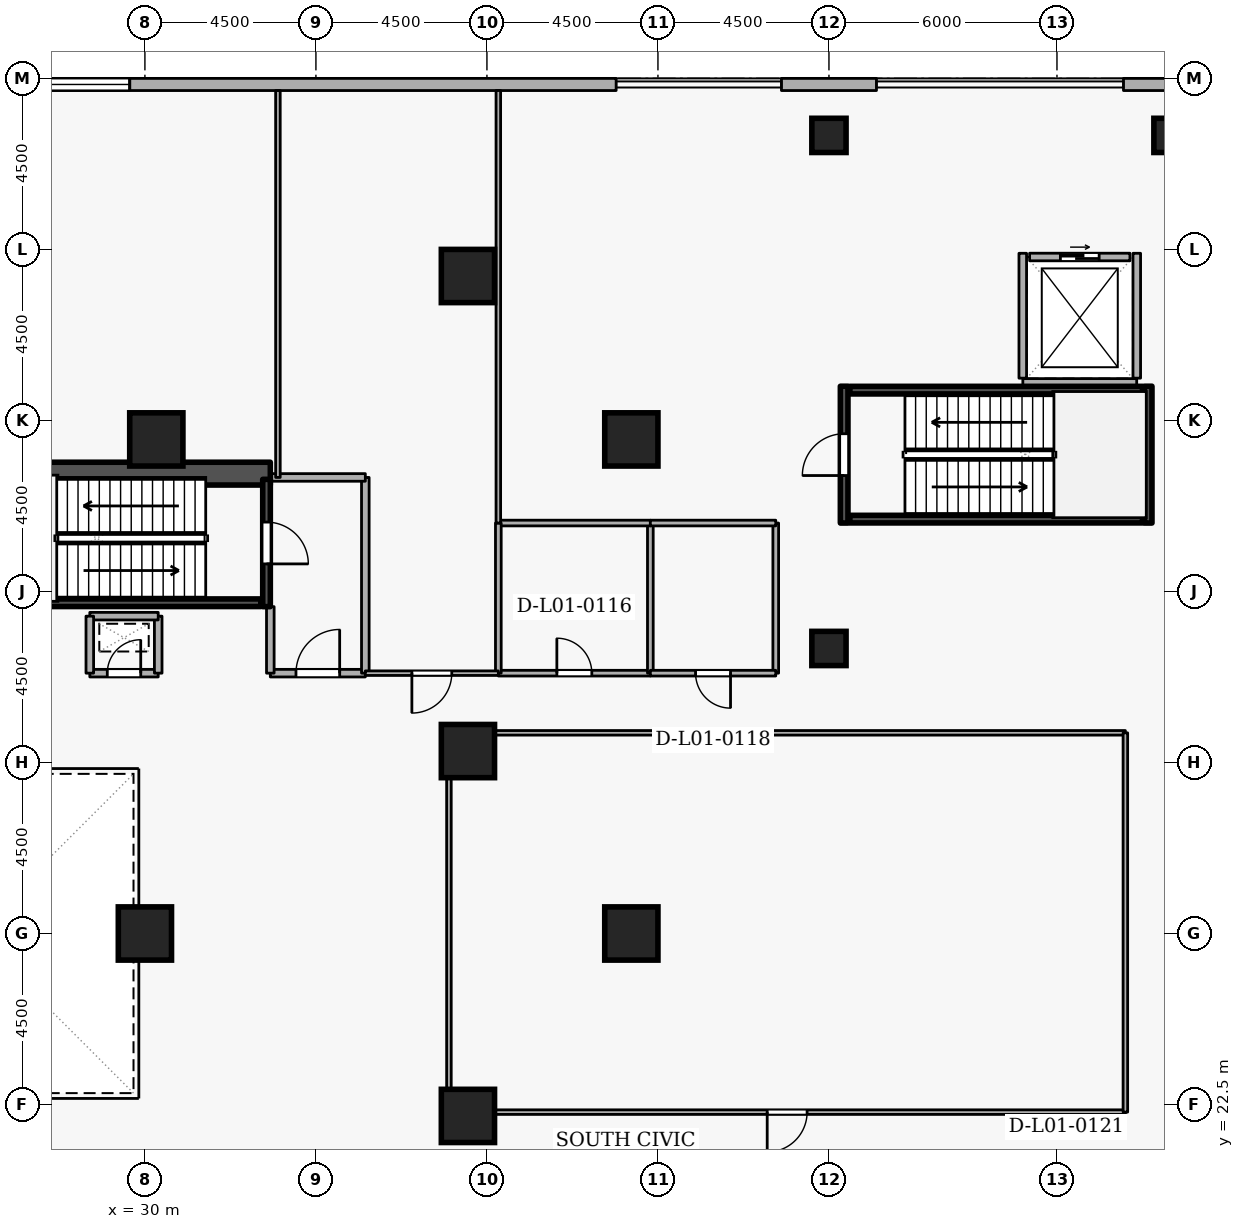
"""IFC4 building model, lengths in metres.
Left out: names, types, materials, properties, quantities, classifications, styles, units other than length and angle.
Written with IfcOpenShell. Run it as: python <this file> out.ifc"""

import sys

from ifc_helpers import new_model, si_unit, direction, frame, frame_2d, origin, origin_2d, place, context, subcontext, project, spatial, rectangle, extrude, element, fill, save


model = new_model("IFC4")
c1 = context("Model", 3, precision=1e-05, world=origin(), true_north=direction((0.0, 1.0)))
c2 = subcontext(c1, "Body", "Model", "MODEL_VIEW")
j1 = project(units=[si_unit("LENGTHUNIT", "METRE"), si_unit("PLANEANGLEUNIT", "RADIAN")], contexts=[c1])
p1 = place(None, origin())
s1 = spatial("IfcSite", under=j1, at=p1, CompositionType="ELEMENT")
p2 = place(p1, origin())
s2 = spatial("IfcBuilding", under=s1, at=p2, CompositionType="ELEMENT")
p3 = place(p2, frame((0.0, 0.0, 4.8)))
s3 = spatial("IfcBuildingStorey", under=s2, at=p3, CompositionType="ELEMENT", Elevation=4.8)
p4 = place(p3, frame((17.7, 39.1, 0.0), z_axis=(0.0, 0.0, 1.0), x_axis=(1.0, 0.0, 0.0)))
e1 = element("IfcWall", 1, at=p4, inside=s3, PredefinedType="SHEAR", context=c2, shape_type="SweptSolid", body=[
    extrude(rectangle(XDim=15.6, YDim=0.6, at=frame_2d((7.8, 0.0))), origin(), (0.0, 0.0, 1.0), 4.8),
])
for number, where, z_axis, x_axis in (
    (2, (42.8, 27.0, 0.0), (0.0, 0.0, 1.0), (1.0, 0.0, 0.0)),
    (3, (42.8, 40.0, 0.0), (0.0, 0.0, 1.0), (1.0, 0.0, 0.0)),
    (4, (38.5, 44.3, 0.0), (0.0, 0.0, 1.0), (1.0, 0.0, 0.0)),
    (5, (38.5, 22.2, 0.0), (0.0, 0.0, 1.0), (1.0, 0.0, 0.0)),
    (6, (38.5, 31.8, 0.0), (0.0, 0.0, 1.0), (1.0, 0.0, 0.0)),
    (7, (30.3, 40.0, 0.0), (0.0, 0.0, 1.0), (1.0, 0.0, 0.0)),
    (8, (30.0, 27.0, 0.0), (0.0, 0.0, 1.0), (1.0, 0.0, 0.0)),
):
    element("IfcColumn", number, at=place(p3, frame(where, z_axis=z_axis, x_axis=x_axis)), inside=s3, PredefinedType="COLUMN", context=c2, shape_type="SweptSolid", body=[
        extrude(rectangle(XDim=1.4, YDim=1.4, at=origin_2d()), origin(), (0.0, 0.0, 1.0), 4.8),
    ])
for number, where, z_axis, x_axis in (
    (9, (48.0, 34.5, 0.0), (0.0, 0.0, 1.0), (1.0, 0.0, 0.0)),
    (10, (48.0, 48.0, 0.0), (0.0, 0.0, 1.0), (1.0, 0.0, 0.0)),
    (11, (57.0, 48.0, 0.0), (0.0, 0.0, 1.0), (1.0, 0.0, 0.0)),
):
    element("IfcColumn", number, at=place(p3, frame(where, z_axis=z_axis, x_axis=x_axis)), inside=s3, PredefinedType="COLUMN", context=c2, shape_type="SweptSolid", body=[
        extrude(rectangle(XDim=0.9, YDim=0.9, at=origin_2d()), origin(), (0.0, 0.0, 1.0), 4.8),
    ])
for number, where, z_axis, x_axis in (
    (12, (58.25, 49.34, 0.0), (0.0, 0.0, 1.0), (-1.0, 0.0, 0.0)),
    (13, (49.25, 49.34, 0.0), (0.0, 0.0, 1.0), (-1.0, 0.0, 0.0)),
):
    element("IfcWall", number, at=place(p3, frame(where, z_axis=z_axis, x_axis=x_axis)), inside=s3, PredefinedType="STANDARD", context=c2, shape_type="SweptSolid", body=[
        extrude(rectangle(XDim=2.5, YDim=0.32, at=frame_2d((1.25, 0.0))), origin(), (0.0, 0.0, 1.0), 3.86),
    ])
p5 = place(p3, frame((42.4, 49.34, 0.0), z_axis=(0.0, 0.0, 1.0), x_axis=(-1.0, 0.0, 0.0)))
e14 = element("IfcWall", 14, at=p5, inside=s3, PredefinedType="STANDARD", context=c2, shape_type="SweptSolid", body=[
    extrude(rectangle(XDim=39.4, YDim=0.32, at=frame_2d((19.7, 0.0))), origin(), (0.0, 0.0, 1.0), 3.86),
])
p6 = place(p5, frame((12.8, 0.0, 0.78)))
e15 = element("IfcOpeningElement", 15, at=p6, cuts=e14, PredefinedType="OPENING", context=c2, shape_type="SweptSolid", body=[
    extrude(rectangle(XDim=2.1, YDim=2.4, at=frame_2d((1.05, 1.2))), frame((0.0, 0.17, 0.0), z_axis=(0.0, -1.0, 0.0), x_axis=(1.0, 0.0, 0.0)), (0.0, 0.0, 1.0), 0.34),
])
p7 = place(p5, frame((22.8, 0.0, 0.78)))
e16 = element("IfcOpeningElement", 16, at=p7, cuts=e14, PredefinedType="OPENING", context=c2, shape_type="SweptSolid", body=[
    extrude(rectangle(XDim=2.1, YDim=2.4, at=frame_2d((1.05, 1.2))), frame((0.0, 0.17, 0.0), z_axis=(0.0, -1.0, 0.0), x_axis=(1.0, 0.0, 0.0)), (0.0, 0.0, 1.0), 0.34),
])
p8 = place(p3, frame((53.28, 44.8, 0.0), z_axis=(0.0, 0.0, 1.0), x_axis=(1.0, 0.0, 0.0)))
e17 = element("IfcWall", 17, at=p8, inside=s3, PredefinedType="STANDARD", context=c2, shape_type="SweptSolid", body=[
    extrude(rectangle(XDim=2.64, YDim=0.2, at=frame_2d((1.32, 0.0))), origin(), (0.0, 0.0, 1.0), 4.46),
])
p9 = place(p8, frame((0.81, 0.0, 0.0)))
e18 = element("IfcOpeningElement", 18, at=p9, cuts=e17, PredefinedType="OPENING", context=c2, shape_type="SweptSolid", body=[
    extrude(rectangle(XDim=1.02, YDim=2.06, at=frame_2d((0.51, 1.03))), frame((0.0, 0.11, 0.0), z_axis=(0.0, -1.0, 0.0), x_axis=(1.0, 0.0, 0.0)), (0.0, 0.0, 1.0), 0.22),
])
p10 = place(p3, frame((53.102, 41.5, 0.0), z_axis=(0.0, 0.0, 1.0), x_axis=(1.0, 0.0, 0.0)))
e19 = element("IfcWall", 19, at=p10, inside=s3, PredefinedType="STANDARD", context=c2, shape_type="SweptSolid", body=[
    extrude(rectangle(XDim=2.996, YDim=0.2, at=frame_2d((1.498, 0.0))), origin(), (0.0, 0.0, 1.0), 4.46),
])
for number, where, z_axis, x_axis in (
    (20, (56.1, 41.612, 0.0), (0.0, 0.0, 1.0), (0.0, 1.0, 0.0)),
    (21, (53.1, 41.612, 0.0), (0.0, 0.0, 1.0), (0.0, 1.0, 0.0)),
):
    element("IfcWall", number, at=place(p3, frame(where, z_axis=z_axis, x_axis=x_axis)), inside=s3, PredefinedType="STANDARD", context=c2, shape_type="SweptSolid", body=[
        extrude(rectangle(XDim=3.286, YDim=0.2, at=frame_2d((1.643, 0.0))), origin(), (0.0, 0.0, 1.0), 4.46),
    ])
p11 = place(p3, frame((33.2, 38.95, 0.0), z_axis=(0.0, 0.0, 1.0), x_axis=(0.0, -1.0, 0.0)))
e22 = element("IfcWall", 22, at=p11, inside=s3, PredefinedType="SHEAR", context=c2, shape_type="SweptSolid", body=[
    extrude(rectangle(XDim=3.35, YDim=0.2, at=frame_2d((1.675, 0.0))), origin(), (0.0, 0.0, 1.0), 4.8),
])
p12 = place(p11, frame((1.125, 0.0, 0.0)))
e23 = element("IfcOpeningElement", 23, at=p12, cuts=e22, PredefinedType="OPENING", context=c2, shape_type="SweptSolid", body=[
    extrude(rectangle(XDim=1.1, YDim=2.1, at=frame_2d((0.55, 1.05))), frame((0.0, 0.11, 0.0), z_axis=(0.0, -1.0, 0.0), x_axis=(1.0, 0.0, 0.0)), (0.0, 0.0, 1.0), 0.22),
])
p13 = place(p3, frame((25.95, 35.703, 0.0), z_axis=(0.0, 0.0, 1.0), x_axis=(1.0, 0.0, 0.0)))
e24 = element("IfcWall", 24, at=p13, inside=s3, PredefinedType="SHEAR", context=c2, shape_type="SweptSolid", body=[
    extrude(rectangle(XDim=7.1, YDim=0.2, at=frame_2d((3.55, 0.0))), origin(), (0.0, 0.0, 1.0), 4.8),
])
p14 = place(p3, frame((48.4, 37.8, 0.0), z_axis=(0.0, 0.0, 1.0), x_axis=(0.0, 1.0, 0.0)))
e25 = element("IfcWall", 25, at=p14, inside=s3, PredefinedType="SHEAR", context=c2, shape_type="SweptSolid", body=[
    extrude(rectangle(XDim=3.6, YDim=0.2, at=frame_2d((1.8, 0.0))), origin(), (0.0, 0.0, 1.0), 4.8),
])
p15 = place(p14, frame((1.25, 0.0, 0.0)))
e26 = element("IfcOpeningElement", 26, at=p15, cuts=e25, PredefinedType="OPENING", context=c2, shape_type="SweptSolid", body=[
    extrude(rectangle(XDim=1.1, YDim=2.1, at=frame_2d((0.55, 1.05))), frame((0.0, 0.11, 0.0), z_axis=(0.0, -1.0, 0.0), x_axis=(1.0, 0.0, 0.0)), (0.0, 0.0, 1.0), 0.22),
])
p16 = place(p3, frame((56.4, 41.4, 0.0), z_axis=(0.0, 0.0, 1.0), x_axis=(0.0, -1.0, 0.0)))
e27 = element("IfcWall", 27, at=p16, inside=s3, PredefinedType="SHEAR", context=c2, shape_type="SweptSolid", body=[
    extrude(rectangle(XDim=3.6, YDim=0.2, at=frame_2d((1.8, 0.0))), origin(), (0.0, 0.0, 1.0), 4.8),
])
for number, where, z_axis, x_axis in (
    (28, (56.25, 41.297, 0.0), (0.0, 0.0, 1.0), (-1.0, 0.0, 0.0)),
    (29, (48.55, 37.903, 0.0), (0.0, 0.0, 1.0), (1.0, 0.0, 0.0)),
):
    element("IfcWall", number, at=place(p3, frame(where, z_axis=z_axis, x_axis=x_axis)), inside=s3, PredefinedType="SHEAR", context=c2, shape_type="SweptSolid", body=[
        extrude(rectangle(XDim=7.7, YDim=0.2, at=frame_2d((3.85, 0.0))), origin(), (0.0, 0.0, 1.0), 4.8),
    ])
p17 = place(p3, frame((33.3, 33.85, 0.0), z_axis=(0.0, 0.0, 1.0), x_axis=(1.0, 0.0, 0.0)))
e30 = element("IfcWall", 30, at=p17, inside=s3, PredefinedType="STANDARD", context=c2, shape_type="SweptSolid", body=[
    extrude(rectangle(XDim=2.5, YDim=0.2, at=frame_2d((1.25, 0.0))), origin(), (0.0, 0.0, 1.0), 4.46),
])
p18 = place(p17, frame((0.675, 0.0, 0.0)))
e31 = element("IfcOpeningElement", 31, at=p18, cuts=e30, PredefinedType="OPENING", context=c2, shape_type="SweptSolid", body=[
    extrude(rectangle(XDim=1.15, YDim=2.1, at=frame_2d((0.575, 1.05))), frame((0.0, 0.11, 0.0), z_axis=(0.0, -1.0, 0.0), x_axis=(1.0, 0.0, 0.0)), (0.0, 0.0, 1.0), 0.22),
])
p19 = place(p3, frame((35.8, 33.85, 0.0), z_axis=(0.0, 0.0, 1.0), x_axis=(0.0, 1.0, 0.0)))
e32 = element("IfcWall", 32, at=p19, inside=s3, PredefinedType="STANDARD", context=c2, shape_type="SweptSolid", body=[
    extrude(rectangle(XDim=5.15, YDim=0.2, at=frame_2d((2.575, 0.0))), origin(), (0.0, 0.0, 1.0), 4.46),
])
p20 = place(p3, frame((35.8, 39.0, 0.0), z_axis=(0.0, 0.0, 1.0), x_axis=(-1.0, 0.0, 0.0)))
e33 = element("IfcWall", 33, at=p20, inside=s3, PredefinedType="STANDARD", context=c2, shape_type="SweptSolid", body=[
    extrude(rectangle(XDim=2.5, YDim=0.2, at=frame_2d((1.25, 0.0))), origin(), (0.0, 0.0, 1.0), 4.46),
])
p21 = place(p3, frame((33.3, 35.6, 0.0), z_axis=(0.0, 0.0, 1.0), x_axis=(0.0, -1.0, 0.0)))
e34 = element("IfcWall", 34, at=p21, inside=s3, PredefinedType="STANDARD", context=c2, shape_type="SweptSolid", body=[
    extrude(rectangle(XDim=1.75, YDim=0.2, at=frame_2d((0.875, 0.0))), origin(), (0.0, 0.0, 1.0), 3.665),
])
p22 = place(p3, frame((28.55, 33.85, 0.0), z_axis=(0.0, 0.0, 1.0), x_axis=(1.0, 0.0, 0.0)))
e35 = element("IfcWall", 35, at=p22, inside=s3, PredefinedType="STANDARD", context=c2, shape_type="SweptSolid", body=[
    extrude(rectangle(XDim=1.8, YDim=0.2, at=frame_2d((0.9, 0.0))), origin(), (0.0, 0.0, 1.0), 4.46),
])
p23 = place(p22, frame((0.46, 0.0, 0.0)))
e36 = element("IfcOpeningElement", 36, at=p23, cuts=e35, PredefinedType="OPENING", context=c2, shape_type="SweptSolid", body=[
    extrude(rectangle(XDim=0.88, YDim=2.04, at=frame_2d((0.44, 1.02))), frame((0.0, 0.11, 0.0), z_axis=(0.0, -1.0, 0.0), x_axis=(1.0, 0.0, 0.0)), (0.0, 0.0, 1.0), 0.22),
])
p24 = place(p3, frame((30.35, 33.85, 0.0), z_axis=(0.0, 0.0, 1.0), x_axis=(0.0, 1.0, 0.0)))
e37 = element("IfcWall", 37, at=p24, inside=s3, PredefinedType="STANDARD", context=c2, shape_type="SweptSolid", body=[
    extrude(rectangle(XDim=1.5, YDim=0.2, at=frame_2d((0.75, 0.0))), origin(), (0.0, 0.0, 1.0), 4.46),
])
p25 = place(p3, frame((30.35, 35.35, 0.0), z_axis=(0.0, 0.0, 1.0), x_axis=(-1.0, 0.0, 0.0)))
e38 = element("IfcWall", 38, at=p25, inside=s3, PredefinedType="STANDARD", context=c2, shape_type="SweptSolid", body=[
    extrude(rectangle(XDim=1.8, YDim=0.2, at=frame_2d((0.9, 0.0))), origin(), (0.0, 0.0, 1.0), 4.46),
])
p26 = place(p3, frame((28.55, 35.35, 0.0), z_axis=(0.0, 0.0, 1.0), x_axis=(0.0, -1.0, 0.0)))
e39 = element("IfcWall", 39, at=p26, inside=s3, PredefinedType="STANDARD", context=c2, shape_type="SweptSolid", body=[
    extrude(rectangle(XDim=1.5, YDim=0.2, at=frame_2d((0.75, 0.0))), origin(), (0.0, 0.0, 1.0), 4.46),
])
p27 = place(p3, frame((39.3, 33.85, 0.0), z_axis=(0.0, 0.0, 1.0), x_axis=(1.0, 0.0, 0.0)))
e40 = element("IfcWall", 40, at=p27, inside=s3, PredefinedType="PARTITIONING", context=c2, shape_type="SweptSolid", body=[
    extrude(rectangle(XDim=4.0, YDim=0.15, at=frame_2d((2.0, 0.0))), origin(), (0.0, 0.0, 1.0), 4.46),
])
p28 = place(p27, frame((1.54, 0.0, 0.0)))
e41 = element("IfcOpeningElement", 41, at=p28, cuts=e40, PredefinedType="OPENING", context=c2, shape_type="SweptSolid", body=[
    extrude(rectangle(XDim=0.92, YDim=2.08, at=frame_2d((0.46, 1.04))), frame((0.0, 0.085, 0.0), z_axis=(0.0, -1.0, 0.0), x_axis=(1.0, 0.0, 0.0)), (0.0, 0.0, 1.0), 0.17),
])
p29 = place(p3, frame((43.3, 33.85, 0.0), z_axis=(0.0, 0.0, 1.0), x_axis=(0.0, 1.0, 0.0)))
e42 = element("IfcWall", 42, at=p29, inside=s3, PredefinedType="PARTITIONING", context=c2, shape_type="SweptSolid", body=[
    extrude(rectangle(XDim=3.95, YDim=0.15, at=frame_2d((1.975, 0.0))), origin(), (0.0, 0.0, 1.0), 4.46),
])
p30 = place(p3, frame((43.3, 37.8, 0.0), z_axis=(0.0, 0.0, 1.0), x_axis=(-1.0, 0.0, 0.0)))
e43 = element("IfcWall", 43, at=p30, inside=s3, PredefinedType="PARTITIONING", context=c2, shape_type="SweptSolid", body=[
    extrude(rectangle(XDim=4.0, YDim=0.15, at=frame_2d((2.0, 0.0))), origin(), (0.0, 0.0, 1.0), 4.46),
])
for number, where, z_axis, x_axis in (
    (44, (39.3, 37.8, 0.0), (0.0, 0.0, 1.0), (0.0, -1.0, 0.0)),
    (45, (46.6, 37.8, 0.0), (0.0, 0.0, 1.0), (0.0, -1.0, 0.0)),
):
    element("IfcWall", number, at=place(p3, frame(where, z_axis=z_axis, x_axis=x_axis)), inside=s3, PredefinedType="PARTITIONING", context=c2, shape_type="SweptSolid", body=[
        extrude(rectangle(XDim=3.95, YDim=0.15, at=frame_2d((1.975, 0.0))), origin(), (0.0, 0.0, 1.0), 4.46),
    ])
p31 = place(p3, frame((46.6, 33.85, 0.0), z_axis=(0.0, 0.0, 1.0), x_axis=(-1.0, 0.0, 0.0)))
e46 = element("IfcWall", 46, at=p31, inside=s3, PredefinedType="PARTITIONING", context=c2, shape_type="SweptSolid", body=[
    extrude(rectangle(XDim=3.3, YDim=0.15, at=frame_2d((1.65, 0.0))), origin(), (0.0, 0.0, 1.0), 4.46),
])
p32 = place(p31, frame((1.19, 0.0, 0.0)))
e47 = element("IfcOpeningElement", 47, at=p32, cuts=e46, PredefinedType="OPENING", context=c2, shape_type="SweptSolid", body=[
    extrude(rectangle(XDim=0.92, YDim=2.08, at=frame_2d((0.46, 1.04))), frame((0.0, 0.085, 0.0), z_axis=(0.0, -1.0, 0.0), x_axis=(1.0, 0.0, 0.0)), (0.0, 0.0, 1.0), 0.17),
])
p33 = place(p3, frame((43.3, 37.8, 0.0), z_axis=(0.0, 0.0, 1.0), x_axis=(1.0, 0.0, 0.0)))
e48 = element("IfcWall", 48, at=p33, inside=s3, PredefinedType="PARTITIONING", context=c2, shape_type="SweptSolid", body=[
    extrude(rectangle(XDim=3.3, YDim=0.15, at=frame_2d((1.65, 0.0))), origin(), (0.0, 0.0, 1.0), 4.46),
])
p34 = place(p3, frame((55.8, 22.3, 0.0), z_axis=(0.0, 0.0, 1.0), x_axis=(-1.0, 0.0, 0.0)))
e49 = element("IfcWall", 49, at=p34, inside=s3, PredefinedType="PARTITIONING", context=c2, shape_type="SweptSolid", body=[
    extrude(rectangle(XDim=17.8, YDim=0.12, at=frame_2d((8.9, 0.0))), origin(), (0.0, 0.0, 1.0), 4.46),
])
p35 = place(p34, frame((8.375, 0.0, 0.0)))
e50 = element("IfcOpeningElement", 50, at=p35, cuts=e49, PredefinedType="OPENING", context=c2, shape_type="SweptSolid", body=[
    extrude(rectangle(XDim=1.05, YDim=2.1, at=frame_2d((0.525, 1.05))), frame((0.0, 0.07, 0.0), z_axis=(0.0, -1.0, 0.0), x_axis=(1.0, 0.0, 0.0)), (0.0, 0.0, 1.0), 0.14),
])
p36 = place(p3, frame((38.0, 22.3, 0.0), z_axis=(0.0, 0.0, 1.0), x_axis=(0.0, 1.0, 0.0)))
e51 = element("IfcWall", 51, at=p36, inside=s3, PredefinedType="PARTITIONING", context=c2, shape_type="SweptSolid", body=[
    extrude(rectangle(XDim=9.98, YDim=0.12, at=frame_2d((4.99, 0.0))), origin(), (0.0, 0.0, 1.0), 4.46),
])
p37 = place(p3, frame((38.0, 32.28, 0.0), z_axis=(0.0, 0.0, 1.0), x_axis=(1.0, 0.0, 0.0)))
e52 = element("IfcWall", 52, at=p37, inside=s3, PredefinedType="PARTITIONING", context=c2, shape_type="SweptSolid", body=[
    extrude(rectangle(XDim=17.8, YDim=0.12, at=frame_2d((8.9, 0.0))), origin(), (0.0, 0.0, 1.0), 4.46),
])
p38 = place(p3, frame((55.8, 32.28, 0.0), z_axis=(0.0, 0.0, 1.0), x_axis=(0.0, -1.0, 0.0)))
e53 = element("IfcWall", 53, at=p38, inside=s3, PredefinedType="PARTITIONING", context=c2, shape_type="SweptSolid", body=[
    extrude(rectangle(XDim=9.98, YDim=0.12, at=frame_2d((4.99, 0.0))), origin(), (0.0, 0.0, 1.0), 4.46),
])
p39 = place(p3, frame((33.5, 39.0, 0.0), z_axis=(0.0, 0.0, 1.0), x_axis=(0.0, 1.0, 0.0)))
e54 = element("IfcWall", 54, at=p39, inside=s3, PredefinedType="PARTITIONING", context=c2, shape_type="SweptSolid", body=[
    extrude(rectangle(XDim=10.18, YDim=0.12, at=frame_2d((5.09, 0.0))), origin(), (0.0, 0.0, 1.0), 4.46),
])
p40 = place(p3, frame((39.3, 49.18, 0.0), z_axis=(0.0, 0.0, 1.0), x_axis=(0.0, -1.0, 0.0)))
e55 = element("IfcWall", 55, at=p40, inside=s3, PredefinedType="PARTITIONING", context=c2, shape_type="SweptSolid", body=[
    extrude(rectangle(XDim=11.38, YDim=0.12, at=frame_2d((5.69, 0.0))), origin(), (0.0, 0.0, 1.0), 4.46),
])
p41 = place(p3, frame((39.3, 33.85, 0.0), z_axis=(0.0, 0.0, 1.0), x_axis=(-1.0, 0.0, 0.0)))
e56 = element("IfcWall", 56, at=p41, inside=s3, PredefinedType="PARTITIONING", context=c2, shape_type="SweptSolid", body=[
    extrude(rectangle(XDim=3.5, YDim=0.12, at=frame_2d((1.75, 0.0))), origin(), (0.0, 0.0, 1.0), 4.46),
])
p42 = place(p41, frame((1.225, 0.0, 0.0)))
e57 = element("IfcOpeningElement", 57, at=p42, cuts=e56, PredefinedType="OPENING", context=c2, shape_type="SweptSolid", body=[
    extrude(rectangle(XDim=1.05, YDim=2.1, at=frame_2d((0.525, 1.05))), frame((0.0, 0.07, 0.0), z_axis=(0.0, -1.0, 0.0), x_axis=(1.0, 0.0, 0.0)), (0.0, 0.0, 1.0), 0.14),
])
p43 = place(p6, origin())
e58 = element("IfcWindow", 58, at=p43, inside=s3, PartitioningType="SINGLE_PANEL", PredefinedType="WINDOW", context=c2, shape_type="SweptSolid", body=[
    extrude(rectangle(XDim=2.1, YDim=2.4, at=frame_2d((1.05, 1.2))), frame((0.0, 0.03, 0.0), z_axis=(0.0, -1.0, 0.0), x_axis=(1.0, 0.0, 0.0)), (0.0, 0.0, 1.0), 0.06),
])
fill(e15, e58)
p44 = place(p9, origin())
e59 = element("IfcDoor", 59, at=p44, inside=s3, OperationType="SLIDING_TO_LEFT", PredefinedType="DOOR", context=c2, shape_type="SweptSolid", body=[
    extrude(rectangle(XDim=1.02, YDim=2.06, at=frame_2d((0.51, 1.03))), frame((0.0, 0.025, 0.0), z_axis=(0.0, -1.0, 0.0), x_axis=(1.0, 0.0, 0.0)), (0.0, 0.0, 1.0), 0.05),
])
fill(e18, e59)
p45 = place(p12, origin())
e60 = element("IfcDoor", 60, at=p45, inside=s3, OperationType="SINGLE_SWING_RIGHT", PredefinedType="DOOR", context=c2, shape_type="SweptSolid", body=[
    extrude(rectangle(XDim=1.1, YDim=2.1, at=frame_2d((0.55, 1.05))), frame((0.0, 0.025, 0.0), z_axis=(0.0, -1.0, 0.0), x_axis=(1.0, 0.0, 0.0)), (0.0, 0.0, 1.0), 0.05),
])
fill(e23, e60)
p46 = place(p15, origin())
e61 = element("IfcDoor", 61, at=p46, inside=s3, OperationType="SINGLE_SWING_LEFT", PredefinedType="DOOR", context=c2, shape_type="SweptSolid", body=[
    extrude(rectangle(XDim=1.1, YDim=2.1, at=frame_2d((0.55, 1.05))), frame((0.0, 0.025, 0.0), z_axis=(0.0, -1.0, 0.0), x_axis=(1.0, 0.0, 0.0)), (0.0, 0.0, 1.0), 0.05),
])
fill(e26, e61)
p47 = place(p18, origin())
e62 = element("IfcDoor", 62, at=p47, inside=s3, OperationType="SINGLE_SWING_RIGHT", PredefinedType="DOOR", context=c2, shape_type="SweptSolid", body=[
    extrude(rectangle(XDim=1.15, YDim=2.1, at=frame_2d((0.575, 1.05))), frame((0.0, 0.025, 0.0), z_axis=(0.0, -1.0, 0.0), x_axis=(1.0, 0.0, 0.0)), (0.0, 0.0, 1.0), 0.05),
])
fill(e31, e62)
p48 = place(p23, origin())
e63 = element("IfcDoor", 63, at=p48, inside=s3, OperationType="SINGLE_SWING_RIGHT", PredefinedType="DOOR", context=c2, shape_type="SweptSolid", body=[
    extrude(rectangle(XDim=0.88, YDim=2.04, at=frame_2d((0.44, 1.02))), frame((0.0, 0.025, 0.0), z_axis=(0.0, -1.0, 0.0), x_axis=(1.0, 0.0, 0.0)), (0.0, 0.0, 1.0), 0.05),
])
fill(e36, e63)
p49 = place(p28, origin())
e64 = element("IfcDoor", 64, at=p49, inside=s3, OperationType="SINGLE_SWING_LEFT", PredefinedType="DOOR", context=c2, shape_type="SweptSolid", body=[
    extrude(rectangle(XDim=0.92, YDim=2.08, at=frame_2d((0.46, 1.04))), frame((0.0, 0.025, 0.0), z_axis=(0.0, -1.0, 0.0), x_axis=(1.0, 0.0, 0.0)), (0.0, 0.0, 1.0), 0.05),
])
fill(e41, e64)
p50 = place(p32, origin())
e65 = element("IfcDoor", 65, at=p50, inside=s3, OperationType="SINGLE_SWING_LEFT", PredefinedType="DOOR", context=c2, shape_type="SweptSolid", body=[
    extrude(rectangle(XDim=0.92, YDim=2.08, at=frame_2d((0.46, 1.04))), frame((0.0, 0.025, 0.0), z_axis=(0.0, -1.0, 0.0), x_axis=(1.0, 0.0, 0.0)), (0.0, 0.0, 1.0), 0.05),
])
fill(e47, e65)
p51 = place(p35, origin())
e66 = element("IfcDoor", 66, at=p51, inside=s3, OperationType="SINGLE_SWING_RIGHT", PredefinedType="DOOR", context=c2, shape_type="SweptSolid", body=[
    extrude(rectangle(XDim=1.05, YDim=2.1, at=frame_2d((0.525, 1.05))), frame((0.0, 0.025, 0.0), z_axis=(0.0, -1.0, 0.0), x_axis=(1.0, 0.0, 0.0)), (0.0, 0.0, 1.0), 0.05),
])
fill(e50, e66)
p52 = place(p42, origin())
e67 = element("IfcDoor", 67, at=p52, inside=s3, OperationType="SINGLE_SWING_RIGHT", PredefinedType="DOOR", context=c2, shape_type="SweptSolid", body=[
    extrude(rectangle(XDim=1.05, YDim=2.1, at=frame_2d((0.525, 1.05))), frame((0.0, 0.025, 0.0), z_axis=(0.0, -1.0, 0.0), x_axis=(1.0, 0.0, 0.0)), (0.0, 0.0, 1.0), 0.05),
])
fill(e57, e67)
save(model, sys.argv[1])
